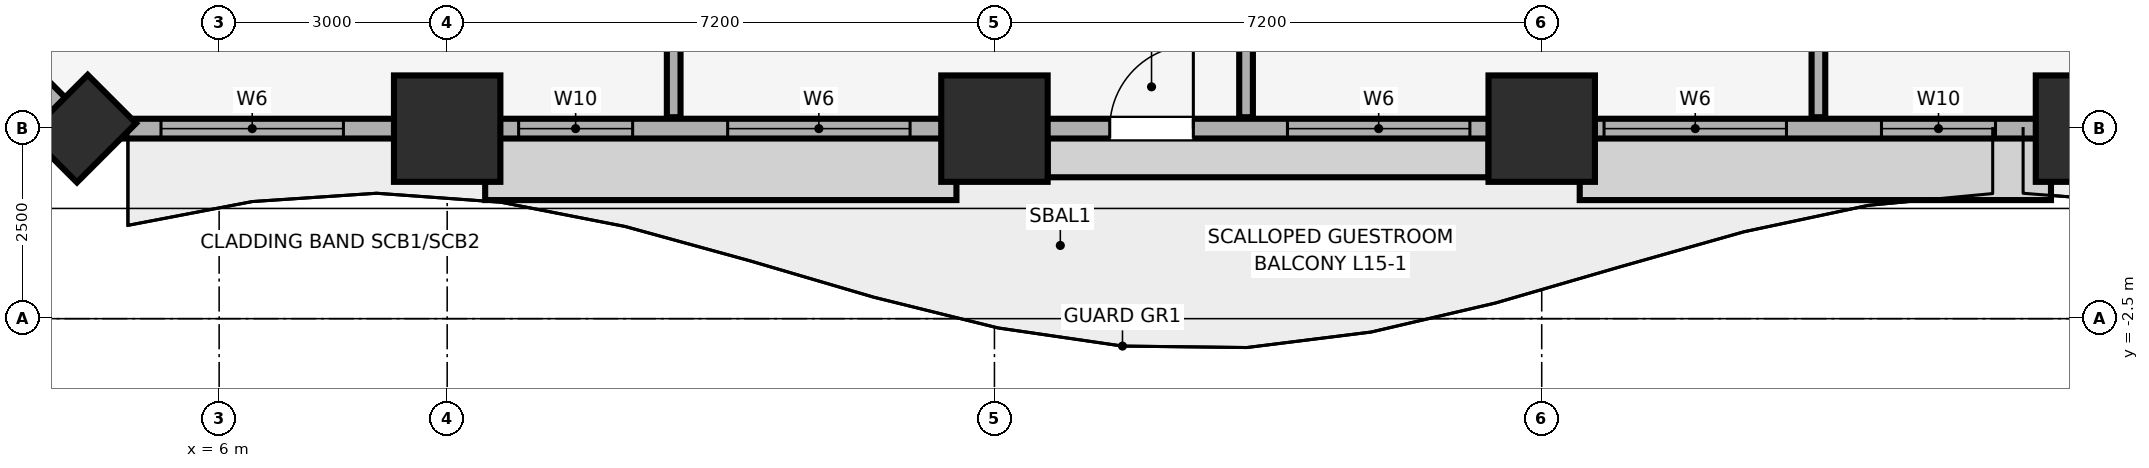
"""IFC4 building model, lengths in metres.
Left out: names, types, materials, properties, quantities, classifications, styles, units other than length and angle.
Written with IfcOpenShell. Run it as: python <this file> out.ifc"""

import sys

from ifc_helpers import new_model, si_unit, direction, frame, frame_2d, origin, origin_2d, place, context, subcontext, project, spatial, rectangle, extrude, element, fill, save


model = new_model("IFC4")
c1 = context("Model", 3, precision=1e-05, world=origin(), true_north=direction((0.0, 1.0)))
c2 = subcontext(c1, "Body", "Model", "MODEL_VIEW")
j1 = project(units=[si_unit("LENGTHUNIT", "METRE"), si_unit("PLANEANGLEUNIT", "RADIAN")], contexts=[c1])
p1 = place(None, origin())
s1 = spatial("IfcSite", under=j1, at=p1, CompositionType="ELEMENT")
p2 = place(p1, origin())
s2 = spatial("IfcBuilding", under=s1, at=p2, CompositionType="ELEMENT")
p3 = place(p2, frame((0.0, 0.0, 68.9)))
s3 = spatial("IfcBuildingStorey", under=s2, at=p3, CompositionType="ELEMENT", Elevation=68.9)
for number, where, z_axis, x_axis in (
    (1, (9.0, 0.0, 0.0), (0.0, 0.0, 1.0), (1.0, 0.0, 0.0)),
    (2, (16.2, 0.0, 0.0), (0.0, 0.0, 1.0), (1.0, 0.0, 0.0)),
    (3, (23.4, 0.0, 0.0), (0.0, 0.0, 1.0), (1.0, 0.0, 0.0)),
    (4, (30.6, 0.0, 0.0), (0.0, 0.0, 1.0), (1.0, 0.0, 0.0)),
):
    element("IfcColumn", number, at=place(p3, frame(where, z_axis=z_axis, x_axis=x_axis)), inside=s3, PredefinedType="COLUMN", context=c2, shape_type="SweptSolid", body=[
        extrude(rectangle(XDim=1.4, YDim=1.4, at=origin_2d()), origin(), (0.0, 0.0, 1.0), 3.51),
    ])
p4 = place(p3, frame((4.2, 0.0, 0.0), z_axis=(0.0, 0.0, 1.0), x_axis=(0.707106781187, 0.707106781187, 0.0)))
e5 = element("IfcColumn", 5, at=p4, inside=s3, PredefinedType="PILASTER", context=c2, shape_type="SweptSolid", body=[
    extrude(rectangle(XDim=1.1, YDim=0.9, at=origin_2d()), origin(), (0.0, 0.0, 1.0), 3.51),
])
p5 = place(p3, frame((4.2, 0.0, 0.0), z_axis=(0.0, 0.0, 1.0), x_axis=(1.0, 0.0, 0.0)))
e6 = element("IfcWall", 6, at=p5, inside=s3, PredefinedType="SOLIDWALL", context=c2, shape_type="SweptSolid", body=[
    extrude(rectangle(XDim=75.6, YDim=0.26, at=frame_2d((37.8, 0.0))), origin(), (0.0, 0.0, 1.0), 2.56),
])
p6 = place(p5, frame((13.517, 0.0, 0.0)))
e7 = element("IfcOpeningElement", 7, at=p6, cuts=e6, PredefinedType="OPENING", context=c2, shape_type="SweptSolid", body=[
    extrude(rectangle(XDim=1.1, YDim=2.15, at=frame_2d((0.55, 1.075))), frame((0.0, 0.14, 0.0), z_axis=(0.0, -1.0, 0.0), x_axis=(1.0, 0.0, 0.0)), (0.0, 0.0, 1.0), 0.28),
])
p7 = place(p5, frame((28.183, 0.0, 0.0)))
e8 = element("IfcOpeningElement", 8, at=p7, cuts=e6, PredefinedType="OPENING", context=c2, shape_type="SweptSolid", body=[
    extrude(rectangle(XDim=1.1, YDim=2.15, at=frame_2d((0.55, 1.075))), frame((0.0, 0.14, 0.0), z_axis=(0.0, -1.0, 0.0), x_axis=(1.0, 0.0, 0.0)), (0.0, 0.0, 1.0), 0.28),
])
p8 = place(p5, frame((58.094, 0.0, 0.0)))
e9 = element("IfcOpeningElement", 9, at=p8, cuts=e6, PredefinedType="OPENING", context=c2, shape_type="SweptSolid", body=[
    extrude(rectangle(XDim=1.1, YDim=2.15, at=frame_2d((0.55, 1.075))), frame((0.0, 0.14, 0.0), z_axis=(0.0, -1.0, 0.0), x_axis=(1.0, 0.0, 0.0)), (0.0, 0.0, 1.0), 0.28),
])
p9 = place(p5, frame((1.035, 0.0, 0.85)))
e10 = element("IfcOpeningElement", 10, at=p9, cuts=e6, PredefinedType="OPENING", context=c2, shape_type="SweptSolid", body=[
    extrude(rectangle(XDim=2.4, YDim=1.5, at=frame_2d((1.2, 0.75))), frame((0.0, 0.14, 0.0), z_axis=(0.0, -1.0, 0.0), x_axis=(1.0, 0.0, 0.0)), (0.0, 0.0, 1.0), 0.28),
])
p10 = place(p5, frame((5.74, 0.0, 0.85)))
e11 = element("IfcOpeningElement", 11, at=p10, cuts=e6, PredefinedType="OPENING", context=c2, shape_type="SweptSolid", body=[
    extrude(rectangle(XDim=1.5, YDim=1.4, at=frame_2d((0.75, 0.7))), frame((0.0, 0.14, 0.0), z_axis=(0.0, -1.0, 0.0), x_axis=(1.0, 0.0, 0.0)), (0.0, 0.0, 1.0), 0.28),
])
p11 = place(p5, frame((8.49, 0.0, 0.85)))
e12 = element("IfcOpeningElement", 12, at=p11, cuts=e6, PredefinedType="OPENING", context=c2, shape_type="SweptSolid", body=[
    extrude(rectangle(XDim=2.4, YDim=1.5, at=frame_2d((1.2, 0.75))), frame((0.0, 0.14, 0.0), z_axis=(0.0, -1.0, 0.0), x_axis=(1.0, 0.0, 0.0)), (0.0, 0.0, 1.0), 0.28),
])
p12 = place(p5, frame((15.855, 0.0, 0.85)))
e13 = element("IfcOpeningElement", 13, at=p12, cuts=e6, PredefinedType="OPENING", context=c2, shape_type="SweptSolid", body=[
    extrude(rectangle(XDim=2.4, YDim=1.5, at=frame_2d((1.2, 0.75))), frame((0.0, 0.14, 0.0), z_axis=(0.0, -1.0, 0.0), x_axis=(1.0, 0.0, 0.0)), (0.0, 0.0, 1.0), 0.28),
])
p13 = place(p5, frame((20.02, 0.0, 0.85)))
e14 = element("IfcOpeningElement", 14, at=p13, cuts=e6, PredefinedType="OPENING", context=c2, shape_type="SweptSolid", body=[
    extrude(rectangle(XDim=2.4, YDim=1.5, at=frame_2d((1.2, 0.75))), frame((0.0, 0.14, 0.0), z_axis=(0.0, -1.0, 0.0), x_axis=(1.0, 0.0, 0.0)), (0.0, 0.0, 1.0), 0.28),
])
p14 = place(p5, frame((23.67, 0.0, 0.85)))
e15 = element("IfcOpeningElement", 15, at=p14, cuts=e6, PredefinedType="OPENING", context=c2, shape_type="SweptSolid", body=[
    extrude(rectangle(XDim=1.5, YDim=1.4, at=frame_2d((0.75, 0.7))), frame((0.0, 0.14, 0.0), z_axis=(0.0, -1.0, 0.0), x_axis=(1.0, 0.0, 0.0)), (0.0, 0.0, 1.0), 0.28),
])
p15 = place(p5, frame((31.035, 0.0, 0.85)))
e16 = element("IfcOpeningElement", 16, at=p15, cuts=e6, PredefinedType="OPENING", context=c2, shape_type="SweptSolid", body=[
    extrude(rectangle(XDim=1.5, YDim=1.4, at=frame_2d((0.75, 0.7))), frame((0.0, 0.14, 0.0), z_axis=(0.0, -1.0, 0.0), x_axis=(1.0, 0.0, 0.0)), (0.0, 0.0, 1.0), 0.28),
])
p16 = place(p5, frame((34.75, 0.0, 0.85)))
e17 = element("IfcOpeningElement", 17, at=p16, cuts=e6, PredefinedType="OPENING", context=c2, shape_type="SweptSolid", body=[
    extrude(rectangle(XDim=2.4, YDim=1.5, at=frame_2d((1.2, 0.75))), frame((0.0, 0.14, 0.0), z_axis=(0.0, -1.0, 0.0), x_axis=(1.0, 0.0, 0.0)), (0.0, 0.0, 1.0), 0.28),
])
p17 = place(p5, frame((38.55, 0.0, 0.85)))
e18 = element("IfcOpeningElement", 18, at=p17, cuts=e6, PredefinedType="OPENING", context=c2, shape_type="SweptSolid", body=[
    extrude(rectangle(XDim=2.4, YDim=1.5, at=frame_2d((1.2, 0.75))), frame((0.0, 0.14, 0.0), z_axis=(0.0, -1.0, 0.0), x_axis=(1.0, 0.0, 0.0)), (0.0, 0.0, 1.0), 0.28),
])
p18 = place(p5, frame((43.165, 0.0, 0.85)))
e19 = element("IfcOpeningElement", 19, at=p18, cuts=e6, PredefinedType="OPENING", context=c2, shape_type="SweptSolid", body=[
    extrude(rectangle(XDim=1.5, YDim=1.4, at=frame_2d((0.75, 0.7))), frame((0.0, 0.14, 0.0), z_axis=(0.0, -1.0, 0.0), x_axis=(1.0, 0.0, 0.0)), (0.0, 0.0, 1.0), 0.28),
])
p19 = place(p5, frame((45.915, 0.0, 0.85)))
e20 = element("IfcOpeningElement", 20, at=p19, cuts=e6, PredefinedType="OPENING", context=c2, shape_type="SweptSolid", body=[
    extrude(rectangle(XDim=2.4, YDim=1.5, at=frame_2d((1.2, 0.75))), frame((0.0, 0.14, 0.0), z_axis=(0.0, -1.0, 0.0), x_axis=(1.0, 0.0, 0.0)), (0.0, 0.0, 1.0), 0.28),
])
p20 = place(p5, frame((50.081, 0.0, 0.85)))
e21 = element("IfcOpeningElement", 21, at=p20, cuts=e6, PredefinedType="OPENING", context=c2, shape_type="SweptSolid", body=[
    extrude(rectangle(XDim=2.4, YDim=1.5, at=frame_2d((1.2, 0.75))), frame((0.0, 0.14, 0.0), z_axis=(0.0, -1.0, 0.0), x_axis=(1.0, 0.0, 0.0)), (0.0, 0.0, 1.0), 0.28),
])
p21 = place(p5, frame((53.73, 0.0, 0.85)))
e22 = element("IfcOpeningElement", 22, at=p21, cuts=e6, PredefinedType="OPENING", context=c2, shape_type="SweptSolid", body=[
    extrude(rectangle(XDim=1.5, YDim=1.4, at=frame_2d((0.75, 0.7))), frame((0.0, 0.14, 0.0), z_axis=(0.0, -1.0, 0.0), x_axis=(1.0, 0.0, 0.0)), (0.0, 0.0, 1.0), 0.28),
])
p22 = place(p5, frame((61.095, 0.0, 0.85)))
e23 = element("IfcOpeningElement", 23, at=p22, cuts=e6, PredefinedType="OPENING", context=c2, shape_type="SweptSolid", body=[
    extrude(rectangle(XDim=1.5, YDim=1.4, at=frame_2d((0.75, 0.7))), frame((0.0, 0.14, 0.0), z_axis=(0.0, -1.0, 0.0), x_axis=(1.0, 0.0, 0.0)), (0.0, 0.0, 1.0), 0.28),
])
p23 = place(p5, frame((64.76, 0.0, 0.85)))
e24 = element("IfcOpeningElement", 24, at=p23, cuts=e6, PredefinedType="OPENING", context=c2, shape_type="SweptSolid", body=[
    extrude(rectangle(XDim=2.4, YDim=1.5, at=frame_2d((1.2, 0.75))), frame((0.0, 0.14, 0.0), z_axis=(0.0, -1.0, 0.0), x_axis=(1.0, 0.0, 0.0)), (0.0, 0.0, 1.0), 0.28),
])
p24 = place(p5, frame((68.41, 0.0, 0.85)))
e25 = element("IfcOpeningElement", 25, at=p24, cuts=e6, PredefinedType="OPENING", context=c2, shape_type="SweptSolid", body=[
    extrude(rectangle(XDim=1.5, YDim=1.4, at=frame_2d((0.75, 0.7))), frame((0.0, 0.14, 0.0), z_axis=(0.0, -1.0, 0.0), x_axis=(1.0, 0.0, 0.0)), (0.0, 0.0, 1.0), 0.28),
])
p25 = place(p5, frame((72.165, 0.0, 0.85)))
e26 = element("IfcOpeningElement", 26, at=p25, cuts=e6, PredefinedType="OPENING", context=c2, shape_type="SweptSolid", body=[
    extrude(rectangle(XDim=2.4, YDim=1.5, at=frame_2d((1.2, 0.75))), frame((0.0, 0.14, 0.0), z_axis=(0.0, -1.0, 0.0), x_axis=(1.0, 0.0, 0.0)), (0.0, 0.0, 1.0), 0.28),
])
p26 = place(p3, frame((0.0, 4.2, 0.0), z_axis=(0.0, 0.0, 1.0), x_axis=(0.707106781187, -0.707106781187, 0.0)))
e27 = element("IfcWall", 27, at=p26, inside=s3, PredefinedType="SOLIDWALL", context=c2, shape_type="SweptSolid", body=[
    extrude(rectangle(XDim=5.94, YDim=0.26, at=frame_2d((2.97, 0.0))), origin(), (0.0, 0.0, 1.0), 2.56),
])
for number, where, z_axis, x_axis in (
    (28, (11.98, 0.15, 0.0), (0.0, 0.0, 1.0), (0.0, 1.0, 0.0)),
    (29, (19.51, 0.15, 0.0), (0.0, 0.0, 1.0), (0.0, 1.0, 0.0)),
):
    element("IfcWall", number, at=place(p3, frame(where, z_axis=z_axis, x_axis=x_axis)), inside=s3, PredefinedType="PARTITIONING", context=c2, shape_type="SweptSolid", body=[
        extrude(rectangle(XDim=12.755, YDim=0.18, at=frame_2d((6.377, 0.0))), origin(), (0.0, 0.0, 1.0), 3.51),
    ])
p27 = place(p3, frame((27.04, 0.15, 0.0), z_axis=(0.0, 0.0, 1.0), x_axis=(0.0, 1.0, 0.0)))
e30 = element("IfcWall", 30, at=p27, inside=s3, PredefinedType="PARTITIONING", context=c2, shape_type="SweptSolid", body=[
    extrude(rectangle(XDim=12.755, YDim=0.18, at=frame_2d((6.377, 0.0))), origin(), (0.0, 0.0, 1.0), 2.898),
])
p28 = place(p6, origin())
e31 = element("IfcDoor", 31, at=p28, inside=s3, OperationType="SINGLE_SWING_RIGHT", PredefinedType="DOOR", context=c2, shape_type="SweptSolid", body=[
    extrude(rectangle(XDim=1.1, YDim=2.15, at=frame_2d((0.55, 1.075))), frame((0.0, 0.025, 0.0), z_axis=(0.0, -1.0, 0.0), x_axis=(1.0, 0.0, 0.0)), (0.0, 0.0, 1.0), 0.05),
])
fill(e7, e31)
p29 = place(p9, origin())
e32 = element("IfcWindow", 32, at=p29, inside=s3, PartitioningType="SINGLE_PANEL", PredefinedType="WINDOW", context=c2, shape_type="SweptSolid", body=[
    extrude(rectangle(XDim=2.4, YDim=1.5, at=frame_2d((1.2, 0.75))), frame((0.0, 0.03, 0.0), z_axis=(0.0, -1.0, 0.0), x_axis=(1.0, 0.0, 0.0)), (0.0, 0.0, 1.0), 0.06),
])
fill(e10, e32)
p30 = place(p10, origin())
e33 = element("IfcWindow", 33, at=p30, inside=s3, PartitioningType="SINGLE_PANEL", PredefinedType="WINDOW", context=c2, shape_type="SweptSolid", body=[
    extrude(rectangle(XDim=1.5, YDim=1.4, at=frame_2d((0.75, 0.7))), frame((0.0, 0.03, 0.0), z_axis=(0.0, -1.0, 0.0), x_axis=(1.0, 0.0, 0.0)), (0.0, 0.0, 1.0), 0.06),
])
fill(e11, e33)
p31 = place(p11, origin())
e34 = element("IfcWindow", 34, at=p31, inside=s3, PartitioningType="SINGLE_PANEL", PredefinedType="WINDOW", context=c2, shape_type="SweptSolid", body=[
    extrude(rectangle(XDim=2.4, YDim=1.5, at=frame_2d((1.2, 0.75))), frame((0.0, 0.03, 0.0), z_axis=(0.0, -1.0, 0.0), x_axis=(1.0, 0.0, 0.0)), (0.0, 0.0, 1.0), 0.06),
])
fill(e12, e34)
p32 = place(p12, origin())
e35 = element("IfcWindow", 35, at=p32, inside=s3, PartitioningType="SINGLE_PANEL", PredefinedType="WINDOW", context=c2, shape_type="SweptSolid", body=[
    extrude(rectangle(XDim=2.4, YDim=1.5, at=frame_2d((1.2, 0.75))), frame((0.0, 0.03, 0.0), z_axis=(0.0, -1.0, 0.0), x_axis=(1.0, 0.0, 0.0)), (0.0, 0.0, 1.0), 0.06),
])
fill(e13, e35)
p33 = place(p13, origin())
e36 = element("IfcWindow", 36, at=p33, inside=s3, PartitioningType="SINGLE_PANEL", PredefinedType="WINDOW", context=c2, shape_type="SweptSolid", body=[
    extrude(rectangle(XDim=2.4, YDim=1.5, at=frame_2d((1.2, 0.75))), frame((0.0, 0.03, 0.0), z_axis=(0.0, -1.0, 0.0), x_axis=(1.0, 0.0, 0.0)), (0.0, 0.0, 1.0), 0.06),
])
fill(e14, e36)
p34 = place(p14, origin())
e37 = element("IfcWindow", 37, at=p34, inside=s3, PartitioningType="SINGLE_PANEL", PredefinedType="WINDOW", context=c2, shape_type="SweptSolid", body=[
    extrude(rectangle(XDim=1.5, YDim=1.4, at=frame_2d((0.75, 0.7))), frame((0.0, 0.03, 0.0), z_axis=(0.0, -1.0, 0.0), x_axis=(1.0, 0.0, 0.0)), (0.0, 0.0, 1.0), 0.06),
])
fill(e15, e37)
save(model, sys.argv[1])
